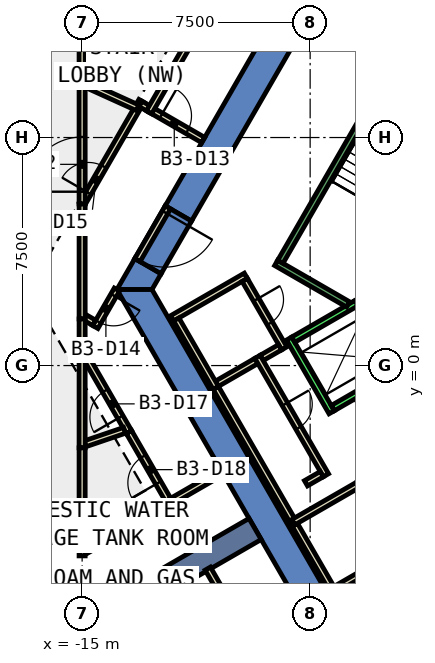
"""IFC4 building model, lengths in metres.
Left out: names, types, materials, properties, quantities, classifications, styles, units other than length and angle.
Written with IfcOpenShell. Run it as: python <this file> out.ifc"""

import sys

from ifc_helpers import new_model, si_unit, direction, frame, frame_2d, origin, place, context, subcontext, project, spatial, polyline, rectangle, outline, extrude, element, fill, save


model = new_model("IFC4")
c1 = context("Model", 3, precision=1e-05, world=origin(), true_north=direction((0.0, 1.0)))
c2 = subcontext(c1, "Body", "Model", "MODEL_VIEW")
j1 = project(units=[si_unit("LENGTHUNIT", "METRE"), si_unit("PLANEANGLEUNIT", "RADIAN")], contexts=[c1])
p1 = place(None, origin())
s1 = spatial("IfcSite", under=j1, at=p1, CompositionType="ELEMENT")
p2 = place(p1, origin())
s2 = spatial("IfcBuilding", under=s1, at=p2, CompositionType="ELEMENT")
p3 = place(p2, frame((0.0, 0.0, -16.5)))
s3 = spatial("IfcBuildingStorey", under=s2, at=p3, CompositionType="ELEMENT", Elevation=-16.5)
p4 = place(p3, origin())
e1 = element("IfcWall", 1, at=p4, inside=s3, PredefinedType="SHEAR", context=c2, shape_type="SweptSolid", body=[
    extrude(outline(polyline([(-12.267, 5.252), (-11.402, 4.752), (-6.351, 13.5), (-6.928, 14.5), (-12.267, 5.252)])), origin(), (0.0, 0.0, 1.0), 5.08),
])
p5 = place(p3, origin())
e2 = element("IfcWall", 2, at=p5, inside=s3, PredefinedType="SHEAR", context=c2, shape_type="SweptSolid", body=[
    extrude(outline(polyline([(-12.402, 3.02), (-13.267, 3.52), (-13.856, 2.5), (-12.702, 2.5), (-12.402, 3.02)])), origin(), (0.0, 0.0, 1.0), 5.08),
])
p6 = place(p3, frame((0.0, 0.0, 3.6)))
e3 = element("IfcWall", 3, at=p6, inside=s3, PredefinedType="SHEAR", context=c2, shape_type="SweptSolid", body=[
    extrude(outline(polyline([(-13.267, 3.52), (-12.402, 3.02), (-11.402, 4.752), (-12.267, 5.252), (-13.267, 3.52)])), origin(), (0.0, 0.0, 1.0), 1.48),
])
p7 = place(p3, origin())
e4 = element("IfcWall", 4, at=p7, inside=s3, PredefinedType="SHEAR", context=c2, shape_type="SweptSolid", body=[
    extrude(outline(polyline([(-13.856, 2.5), (-6.928, -9.5), (-6.351, -8.5), (-12.702, 2.5), (-13.856, 2.5)])), origin(), (0.0, 0.0, 1.0), 5.08),
])
p8 = place(p3, frame((-9.31, -5.375, 0.0), z_axis=(0.0, 0.0, 1.0), x_axis=(-0.866017533419, -0.500013631625, 0.0)))
e5 = element("IfcWall", 5, at=p8, inside=s3, PredefinedType="SHEAR", context=c2, shape_type="SweptSolid", body=[
    extrude(rectangle(XDim=9.0, YDim=0.8, at=frame_2d((4.5, 0.0))), origin(), (0.0, 0.0, 1.0), 5.08),
])
p9 = place(p3, frame((-8.033, -11.587, 0.0), z_axis=(0.0, 0.0, 1.0), x_axis=(-0.499974742752, 0.866039985572, 0.0)))
e6 = element("IfcWall", 6, at=p9, inside=s3, PredefinedType="PARTITIONING", context=c2, shape_type="SweptSolid", body=[
    extrude(rectangle(XDim=5.668, YDim=0.2, at=frame_2d((2.834, 0.0))), origin(), (0.0, 0.0, 1.0), 5.08),
])
p10 = place(p9, frame((1.788, 0.0, 0.0)))
e7 = element("IfcOpeningElement", 7, at=p10, cuts=e6, PredefinedType="OPENING", context=c2, shape_type="SweptSolid", body=[
    extrude(rectangle(XDim=1.0, YDim=2.1, at=frame_2d((0.5, 1.05))), frame((0.0, 0.11, 0.0), z_axis=(0.0, -1.0, 0.0), x_axis=(1.0, 0.0, 0.0)), (0.0, 0.0, 1.0), 0.22),
])
p11 = place(p3, frame((-12.749, 8.417, 0.0), z_axis=(0.0, 0.0, 1.0), x_axis=(0.866010750942, -0.50002537861, 0.0)))
e8 = element("IfcWall", 8, at=p11, inside=s3, PredefinedType="PARTITIONING", context=c2, shape_type="SweptSolid", body=[
    extrude(rectangle(XDim=2.0, YDim=0.2, at=frame_2d((1.0, 0.0))), origin(), (0.0, 0.0, 1.0), 5.08),
])
p12 = place(p11, frame((0.4, 0.0, 0.0)))
e9 = element("IfcOpeningElement", 9, at=p12, cuts=e8, PredefinedType="OPENING", context=c2, shape_type="SweptSolid", body=[
    extrude(rectangle(XDim=1.0, YDim=2.1, at=frame_2d((0.5, 1.05))), frame((0.0, 0.11, 0.0), z_axis=(0.0, -1.0, 0.0), x_axis=(1.0, 0.0, 0.0)), (0.0, 0.0, 1.0), 0.22),
])
p13 = place(p3, frame((-13.856, 2.5, 0.0), z_axis=(0.0, 0.0, 1.0), x_axis=(-0.499831418649, -0.866122712398, 0.0)))
e10 = element("IfcWall", 10, at=p13, inside=s3, PredefinedType="PARTITIONING", context=c2, shape_type="SweptSolid", body=[
    extrude(rectangle(XDim=1.422, YDim=0.2, at=frame_2d((0.711, 0.0))), origin(), (0.0, 0.0, 1.0), 5.08),
])
p14 = place(p13, frame((0.224, 0.0, 0.0)))
e11 = element("IfcOpeningElement", 11, at=p14, cuts=e10, PredefinedType="OPENING", context=c2, shape_type="SweptSolid", body=[
    extrude(rectangle(XDim=1.0, YDim=2.1, at=frame_2d((0.5, 1.05))), frame((0.0, 0.11, 0.0), z_axis=(0.0, -1.0, 0.0), x_axis=(1.0, 0.0, 0.0)), (0.0, 0.0, 1.0), 0.22),
])
p15 = place(p3, frame((-14.604, 1.405, 0.0), z_axis=(0.0, 0.0, 1.0), x_axis=(-0.865410684717, 0.501063216349, 0.0)))
e12 = element("IfcWall", 12, at=p15, inside=s3, PredefinedType="PARTITIONING", context=c2, shape_type="SweptSolid", body=[
    extrude(rectangle(XDim=0.357, YDim=0.2, at=frame_2d((0.179, 0.0))), origin(), (0.0, 0.0, 1.0), 5.08),
])
p16 = place(p3, frame((-15.0, 5.318, 0.0), z_axis=(0.0, 0.0, 1.0), x_axis=(0.500034145141, 0.866005689181, 0.0)))
e13 = element("IfcWall", 13, at=p16, inside=s3, PredefinedType="PARTITIONING", context=c2, shape_type="SweptSolid", body=[
    extrude(rectangle(XDim=3.91, YDim=0.2, at=frame_2d((1.955, 0.0))), origin(), (0.0, 0.0, 1.0), 5.08),
])
p17 = place(p16, frame((0.418, 0.0, 0.0)))
e14 = element("IfcOpeningElement", 14, at=p17, cuts=e13, PredefinedType="OPENING", context=c2, shape_type="SweptSolid", body=[
    extrude(rectangle(XDim=1.0, YDim=2.1, at=frame_2d((0.5, 1.05))), frame((0.0, 0.11, 0.0), z_axis=(0.0, -1.0, 0.0), x_axis=(1.0, 0.0, 0.0)), (0.0, 0.0, 1.0), 0.22),
])
p18 = place(p3, frame((-13.082, 8.609, 0.0), z_axis=(0.0, 0.0, 1.0), x_axis=(0.865998573537, -0.500046468473, 0.0)))
e15 = element("IfcWall", 15, at=p18, inside=s3, PredefinedType="PARTITIONING", context=c2, shape_type="SweptSolid", body=[
    extrude(rectangle(XDim=0.37, YDim=0.2, at=frame_2d((0.185, 0.0))), origin(), (0.0, 0.0, 1.0), 5.08),
])
p19 = place(p3, frame((-15.0, 1.534, 0.0), z_axis=(0.0, 0.0, 1.0), x_axis=(0.0, 1.0, 0.0)))
e16 = element("IfcWall", 16, at=p19, inside=s3, PredefinedType="PARTITIONING", context=c2, shape_type="SweptSolid", body=[
    extrude(rectangle(XDim=3.784, YDim=0.2, at=frame_2d((1.892, 0.0))), origin(), (0.0, 0.0, 1.0), 5.08),
])
p20 = place(p3, frame((-12.799, 8.33, 0.0), z_axis=(0.0, 0.0, 1.0), x_axis=(0.499923440311, 0.86606960103, 0.0)))
e17 = element("IfcWall", 17, at=p20, inside=s3, PredefinedType="PARTITIONING", context=c2, shape_type="SweptSolid", body=[
    extrude(rectangle(XDim=9.534, YDim=0.2, at=frame_2d((4.767, 0.0))), origin(), (0.0, 0.0, 1.0), 5.08),
])
p21 = place(p20, frame((5.766, 0.0, 0.0)))
e18 = element("IfcOpeningElement", 18, at=p21, cuts=e17, PredefinedType="OPENING", context=c2, shape_type="SweptSolid", body=[
    extrude(rectangle(XDim=1.0, YDim=2.1, at=frame_2d((0.5, 1.05))), frame((0.0, 0.11, 0.0), z_axis=(0.0, -1.0, 0.0), x_axis=(1.0, 0.0, 0.0)), (0.0, 0.0, 1.0), 0.22),
])
p22 = place(p3, frame((-13.46, -2.186, 0.0), z_axis=(0.0, 0.0, 1.0), x_axis=(-0.500060979923, 0.865990194147, 0.0)))
e19 = element("IfcWall", 19, at=p22, inside=s3, PredefinedType="PARTITIONING", context=c2, shape_type="SweptSolid", body=[
    extrude(rectangle(XDim=3.08, YDim=0.2, at=frame_2d((1.54, 0.0))), origin(), (0.0, 0.0, 1.0), 5.08),
])
p23 = place(p22, frame((0.569, 0.0, 0.0)))
e20 = element("IfcOpeningElement", 20, at=p23, cuts=e19, PredefinedType="OPENING", context=c2, shape_type="SweptSolid", body=[
    extrude(rectangle(XDim=1.0, YDim=2.1, at=frame_2d((0.5, 1.05))), frame((0.0, 0.11, 0.0), z_axis=(0.0, -1.0, 0.0), x_axis=(1.0, 0.0, 0.0)), (0.0, 0.0, 1.0), 0.22),
])
p24 = place(p3, frame((-12.124, -4.5, 0.0), z_axis=(0.0, 0.0, 1.0), x_axis=(-0.499991375441, 0.866030383119, 0.0)))
e21 = element("IfcWall", 21, at=p24, inside=s3, PredefinedType="PARTITIONING", context=c2, shape_type="SweptSolid", body=[
    extrude(rectangle(XDim=2.672, YDim=0.2, at=frame_2d((1.336, 0.0))), origin(), (0.0, 0.0, 1.0), 5.08),
])
p25 = place(p24, frame((0.743, 0.0, 0.0)))
e22 = element("IfcOpeningElement", 22, at=p25, cuts=e21, PredefinedType="OPENING", context=c2, shape_type="SweptSolid", body=[
    extrude(rectangle(XDim=1.0, YDim=2.1, at=frame_2d((0.5, 1.05))), frame((0.0, 0.11, 0.0), z_axis=(0.0, -1.0, 0.0), x_axis=(1.0, 0.0, 0.0)), (0.0, 0.0, 1.0), 0.22),
])
p26 = place(p3, frame((-10.392, -3.5, 0.0), z_axis=(0.0, 0.0, 1.0), x_axis=(-0.865980106173, -0.500078449558, 0.0)))
e23 = element("IfcWall", 23, at=p26, inside=s3, PredefinedType="PARTITIONING", context=c2, shape_type="SweptSolid", body=[
    extrude(rectangle(XDim=1.9, YDim=0.2, at=frame_2d((0.95, 0.0))), origin(), (0.0, 0.0, 1.0), 5.08),
])
p27 = place(p3, frame((-15.0, 0.581, 0.0), z_axis=(0.0, 0.0, 1.0), x_axis=(0.0, 1.0, 0.0)))
e24 = element("IfcWall", 24, at=p27, inside=s3, PredefinedType="PARTITIONING", context=c2, shape_type="SweptSolid", body=[
    extrude(rectangle(XDim=0.953, YDim=0.2, at=frame_2d((0.477, 0.0))), origin(), (0.0, 0.0, 1.0), 5.08),
])
p28 = place(p3, frame((-14.909, 9.264, 0.0), z_axis=(0.0, 0.0, 1.0), x_axis=(0.910722060418, -0.41301976789, 0.0)))
e25 = element("IfcWall", 25, at=p28, inside=s3, PredefinedType="PARTITIONING", context=c2, shape_type="SweptSolid", body=[
    extrude(rectangle(XDim=1.903, YDim=0.2, at=frame_2d((0.951, 0.0))), origin(), (0.0, 0.0, 1.0), 5.08),
])
p29 = place(p3, frame((-15.0, 5.318, 0.0), z_axis=(0.0, 0.0, 1.0), x_axis=(0.0, 1.0, 0.0)))
e26 = element("IfcWall", 26, at=p29, inside=s3, PredefinedType="PARTITIONING", context=c2, shape_type="SweptSolid", body=[
    extrude(rectangle(XDim=4.087, YDim=0.2, at=frame_2d((2.043, 0.0))), origin(), (0.0, 0.0, 1.0), 5.08),
])
p30 = place(p29, frame((0.4, 0.0, 0.0)))
e27 = element("IfcOpeningElement", 27, at=p30, cuts=e26, PredefinedType="OPENING", context=c2, shape_type="SweptSolid", body=[
    extrude(rectangle(XDim=1.8, YDim=2.1, at=frame_2d((0.9, 1.05))), frame((0.0, 0.11, 0.0), z_axis=(0.0, -1.0, 0.0), x_axis=(1.0, 0.0, 0.0)), (0.0, 0.0, 1.0), 0.22),
])
p31 = place(p3, frame((-15.0, 9.405, 0.0), z_axis=(0.0, 0.0, 1.0), x_axis=(0.0, 1.0, 0.0)))
e28 = element("IfcWall", 28, at=p31, inside=s3, PredefinedType="PARTITIONING", context=c2, shape_type="SweptSolid", body=[
    extrude(rectangle(XDim=23.495, YDim=0.2, at=frame_2d((11.748, 0.0))), origin(), (0.0, 0.0, 1.0), 5.08),
])
p32 = place(p3, frame((-13.605, -2.131, 0.0), z_axis=(0.0, 0.0, 1.0), x_axis=(-0.946582963452, -0.32246037478, 0.0)))
e29 = element("IfcWall", 29, at=p32, inside=s3, PredefinedType="PARTITIONING", context=c2, shape_type="SweptSolid", body=[
    extrude(rectangle(XDim=1.373, YDim=0.2, at=frame_2d((0.687, 0.0))), origin(), (0.0, 0.0, 1.0), 5.08),
])
p33 = place(p3, frame((-15.0, -2.706, 0.0), z_axis=(0.0, 0.0, 1.0), x_axis=(0.0, 1.0, 0.0)))
e30 = element("IfcWall", 30, at=p33, inside=s3, PredefinedType="PARTITIONING", context=c2, shape_type="SweptSolid", body=[
    extrude(rectangle(XDim=3.287, YDim=0.2, at=frame_2d((1.644, 0.0))), origin(), (0.0, 0.0, 1.0), 5.08),
])
p34 = place(p3, frame((-12.037, -4.45, 0.0), z_axis=(0.0, 0.0, 1.0), x_axis=(-0.866063163075, -0.499934593286, 0.0)))
e31 = element("IfcWall", 31, at=p34, inside=s3, PredefinedType="PARTITIONING", context=c2, shape_type="SweptSolid", body=[
    extrude(rectangle(XDim=3.321, YDim=0.2, at=frame_2d((1.66, 0.0))), origin(), (0.0, 0.0, 1.0), 5.08),
])
p35 = place(p3, frame((-15.0, -6.26, 0.0), z_axis=(0.0, 0.0, 1.0), x_axis=(0.0, 1.0, 0.0)))
e32 = element("IfcWall", 32, at=p35, inside=s3, PredefinedType="PARTITIONING", context=c2, shape_type="SweptSolid", body=[
    extrude(rectangle(XDim=3.554, YDim=0.2, at=frame_2d((1.777, 0.0))), origin(), (0.0, 0.0, 1.0), 5.08),
])
p36 = place(p3, frame((-9.267, 0.152, 0.0), z_axis=(0.0, 0.0, 1.0), x_axis=(-0.86599040064, -0.500060622324, 0.0)))
e33 = element("IfcWall", 33, at=p36, inside=s3, PredefinedType="PARTITIONING", context=c2, shape_type="SweptSolid", body=[
    extrude(rectangle(XDim=1.5, YDim=0.2, at=frame_2d((0.75, 0.0))), origin(), (0.0, 0.0, 1.0), 5.08),
])
p37 = place(p3, frame((-12.04, 1.553, 0.0), z_axis=(0.0, 0.0, 1.0), x_axis=(0.866056369097, 0.49994636267, 0.0)))
e34 = element("IfcWall", 34, at=p37, inside=s3, PredefinedType="PARTITIONING", context=c2, shape_type="SweptSolid", body=[
    extrude(rectangle(XDim=2.8, YDim=0.2, at=frame_2d((1.4, 0.0))), origin(), (0.0, 0.0, 1.0), 5.08),
])
p38 = place(p3, frame((-9.651, 2.817, 0.0), z_axis=(0.0, 0.0, 1.0), x_axis=(0.49989585183, -0.866085525409, 0.0)))
e35 = element("IfcWall", 35, at=p38, inside=s3, PredefinedType="PARTITIONING", context=c2, shape_type="SweptSolid", body=[
    extrude(rectangle(XDim=2.6, YDim=0.2, at=frame_2d((1.3, 0.0))), origin(), (0.0, 0.0, 1.0), 5.08),
])
p39 = place(p38, frame((0.75, 0.0, 0.0)))
e36 = element("IfcOpeningElement", 36, at=p39, cuts=e35, PredefinedType="OPENING", context=c2, shape_type="SweptSolid", body=[
    extrude(rectangle(XDim=0.9, YDim=2.1, at=frame_2d((0.45, 1.05))), frame((0.0, 0.11, 0.0), z_axis=(0.0, -1.0, 0.0), x_axis=(1.0, 0.0, 0.0)), (0.0, 0.0, 1.0), 0.22),
])
p40 = place(p3, frame((-8.488, 0.602, 0.0), z_axis=(0.0, 0.0, 1.0), x_axis=(-0.865871789474, -0.500265973451, 0.0)))
e37 = element("IfcWall", 37, at=p40, inside=s3, PredefinedType="PARTITIONING", context=c2, shape_type="SweptSolid", body=[
    extrude(rectangle(XDim=0.7, YDim=0.2, at=frame_2d((0.35, 0.0))), origin(), (0.0, 0.0, 1.0), 5.08),
])
p41 = place(p3, frame((-10.603, -0.735, 0.0), z_axis=(0.0, 0.0, 1.0), x_axis=(-0.499925626596, 0.866068339032, 0.0)))
e38 = element("IfcWall", 38, at=p41, inside=s3, PredefinedType="PARTITIONING", context=c2, shape_type="SweptSolid", body=[
    extrude(rectangle(XDim=2.601, YDim=0.2, at=frame_2d((1.3, 0.0))), origin(), (0.0, 0.0, 1.0), 5.08),
])
p42 = place(p3, frame((-9.231, 0.288, 0.0), z_axis=(0.0, 0.0, 1.0), x_axis=(0.500013631625, -0.866017533419, 0.0)))
e39 = element("IfcWall", 39, at=p42, inside=s3, PredefinedType="PARTITIONING", context=c2, shape_type="SweptSolid", body=[
    extrude(rectangle(XDim=4.5, YDim=0.2, at=frame_2d((2.25, 0.0))), origin(), (0.0, 0.0, 1.0), 5.08),
])
p43 = place(p42, frame((1.8, 0.0, 0.0)))
e40 = element("IfcOpeningElement", 40, at=p43, cuts=e39, PredefinedType="OPENING", context=c2, shape_type="SweptSolid", body=[
    extrude(rectangle(XDim=0.9, YDim=2.1, at=frame_2d((0.45, 1.05))), frame((0.0, 0.11, 0.0), z_axis=(0.0, -1.0, 0.0), x_axis=(1.0, 0.0, 0.0)), (0.0, 0.0, 1.0), 0.22),
])
p44 = place(p3, frame((-7.117, -3.572, 0.0), z_axis=(0.0, 0.0, 1.0), x_axis=(-0.866158505053, -0.499769390944, 0.0)))
e41 = element("IfcWall", 41, at=p44, inside=s3, PredefinedType="PARTITIONING", context=c2, shape_type="SweptSolid", body=[
    extrude(rectangle(XDim=0.6, YDim=0.2, at=frame_2d((0.3, 0.0))), origin(), (0.0, 0.0, 1.0), 5.08),
])
p45 = place(p3, frame((-8.003, -5.238, 0.0), z_axis=(0.0, 0.0, 1.0), x_axis=(-0.500047596559, 0.865997922154, 0.0)))
e42 = element("IfcWall", 42, at=p45, inside=s3, PredefinedType="PARTITIONING", context=c2, shape_type="SweptSolid", body=[
    extrude(rectangle(XDim=5.2, YDim=0.2, at=frame_2d((2.6, 0.0))), origin(), (0.0, 0.0, 1.0), 5.08),
])
p46 = place(p3, frame((-6.803, -7.317, 0.0), z_axis=(0.0, 0.0, 1.0), x_axis=(-0.499913221443, 0.866075499611, 0.0)))
e43 = element("IfcWall", 43, at=p46, inside=s3, PredefinedType="PARTITIONING", context=c2, shape_type="SweptSolid", body=[
    extrude(rectangle(XDim=2.4, YDim=0.2, at=frame_2d((1.2, 0.0))), origin(), (0.0, 0.0, 1.0), 5.08),
])
p47 = place(p3, frame((-8.053, -5.151, 0.0), z_axis=(0.0, 0.0, 1.0), x_axis=(0.866234368172, 0.499637888272, 0.0)))
e44 = element("IfcWall", 44, at=p47, inside=s3, PredefinedType="PARTITIONING", context=c2, shape_type="SweptSolid", body=[
    extrude(rectangle(XDim=2.499, YDim=0.2, at=frame_2d((1.25, 0.0))), origin(), (0.0, 0.0, 1.0), 5.08),
])
p48 = place(p3, frame((-4.415, -6.053, 0.0), z_axis=(0.0, 0.0, 1.0), x_axis=(-0.866056369097, -0.49994636267, 0.0)))
e45 = element("IfcWall", 45, at=p48, inside=s3, PredefinedType="PARTITIONING", context=c2, shape_type="SweptSolid", body=[
    extrude(rectangle(XDim=2.8, YDim=0.2, at=frame_2d((1.4, 0.0))), origin(), (0.0, 0.0, 1.0), 5.08),
])
p49 = place(p3, frame((-5.126, -2.422, 0.0), z_axis=(0.0, 0.0, 1.0), x_axis=(-0.500062241894, 0.865989465428, 0.0)))
e46 = element("IfcWall", 46, at=p49, inside=s3, PredefinedType="PARTITIONING", context=c2, shape_type="SweptSolid", body=[
    extrude(rectangle(XDim=1.7, YDim=0.2, at=frame_2d((0.85, 0.0))), origin(), (0.0, 0.0, 1.0), 5.08),
])
p50 = place(p3, frame((-12.18, 5.202, 0.0), z_axis=(0.0, 0.0, 1.0), x_axis=(-0.50002537861, -0.866010750942, 0.0)))
e47 = element("IfcWall", 47, at=p50, inside=s3, PredefinedType="PARTITIONING", context=c2, shape_type="SweptSolid", body=[
    extrude(rectangle(XDim=2.0, YDim=0.2, at=frame_2d((1.0, 0.0))), origin(), (0.0, 0.0, 1.0), 2.4),
])
p51 = place(p50, frame((0.19, 0.0, 0.0)))
e48 = element("IfcOpeningElement", 48, at=p51, cuts=e47, PredefinedType="OPENING", context=c2, shape_type="SweptSolid", body=[
    extrude(rectangle(XDim=1.8, YDim=2.1, at=frame_2d((0.9, 1.05))), frame((0.0, 0.11, 0.0), z_axis=(0.0, -1.0, 0.0), x_axis=(1.0, 0.0, 0.0)), (0.0, 0.0, 1.0), 0.22),
])
p52 = place(p3, frame((-8.192, 0.888, 0.0), z_axis=(0.0, 0.0, 1.0), x_axis=(0.49994636267, -0.866056369097, 0.0)))
e49 = element("IfcWall", 49, at=p52, inside=s3, PredefinedType="STANDARD", context=c2, shape_type="SweptSolid", body=[
    extrude(rectangle(XDim=2.8, YDim=0.2, at=frame_2d((1.4, 0.0))), origin(), (0.0, 0.0, 1.0), 5.08),
])
for number, where, z_axis, x_axis in (
    (50, (-5.977, 2.052, 0.0), (0.0, 0.0, 1.0), (-0.866, -0.5, 0.0)),
    (51, (-4.677, -0.2, 0.0), (0.0, 0.0, 1.0), (-0.866, -0.5, 0.0)),
):
    element("IfcWall", number, at=place(p3, frame(where, z_axis=z_axis, x_axis=x_axis)), inside=s3, PredefinedType="STANDARD", context=c2, shape_type="SweptSolid", body=[
        extrude(rectangle(XDim=2.399, YDim=0.2, at=frame_2d((1.2, 0.0))), origin(), (0.0, 0.0, 1.0), 5.08),
    ])
p53 = place(p3, frame((-6.25, 2.01, 0.0), z_axis=(0.0, 0.0, 1.0), x_axis=(-0.86611865017, 0.499838457731, 0.0)))
e52 = element("IfcWall", 52, at=p53, inside=s3, PredefinedType="STANDARD", context=c2, shape_type="SweptSolid", body=[
    extrude(rectangle(XDim=2.733, YDim=0.2, at=frame_2d((1.366, 0.0))), origin(), (0.0, 0.0, 1.0), 5.08),
])
p54 = place(p3, frame((-5.03, 9.388, 0.0), z_axis=(0.0, 0.0, 1.0), x_axis=(-0.499978703459, -0.866037698999, 0.0)))
e53 = element("IfcWall", 53, at=p54, inside=s3, PredefinedType="STANDARD", context=c2, shape_type="SweptSolid", body=[
    extrude(rectangle(XDim=6.9, YDim=0.2, at=frame_2d((3.45, 0.0))), origin(), (0.0, 0.0, 1.0), 5.08),
])
p55 = place(p12, origin())
e54 = element("IfcDoor", 54, at=p55, inside=s3, OperationType="SINGLE_SWING_LEFT", PredefinedType="DOOR", context=c2, shape_type="SweptSolid", body=[
    extrude(rectangle(XDim=1.0, YDim=2.1, at=frame_2d((0.5, 1.05))), frame((0.0, 0.025, 0.0), z_axis=(0.0, -1.0, 0.0), x_axis=(1.0, 0.0, 0.0)), (0.0, 0.0, 1.0), 0.05),
])
fill(e9, e54)
p56 = place(p14, origin())
e55 = element("IfcDoor", 55, at=p56, inside=s3, OperationType="SINGLE_SWING_RIGHT", PredefinedType="DOOR", context=c2, shape_type="SweptSolid", body=[
    extrude(rectangle(XDim=1.0, YDim=2.1, at=frame_2d((0.5, 1.05))), frame((0.0, 0.025, 0.0), z_axis=(0.0, -1.0, 0.0), x_axis=(1.0, 0.0, 0.0)), (0.0, 0.0, 1.0), 0.05),
])
fill(e11, e55)
p57 = place(p17, origin())
e56 = element("IfcDoor", 56, at=p57, inside=s3, OperationType="SINGLE_SWING_LEFT", PredefinedType="DOOR", context=c2, shape_type="SweptSolid", body=[
    extrude(rectangle(XDim=1.0, YDim=2.1, at=frame_2d((0.5, 1.05))), frame((0.0, 0.025, 0.0), z_axis=(0.0, -1.0, 0.0), x_axis=(1.0, 0.0, 0.0)), (0.0, 0.0, 1.0), 0.05),
])
fill(e14, e56)
p58 = place(p23, origin())
e57 = element("IfcDoor", 57, at=p58, inside=s3, OperationType="SINGLE_SWING_LEFT", PredefinedType="DOOR", context=c2, shape_type="SweptSolid", body=[
    extrude(rectangle(XDim=1.0, YDim=2.1, at=frame_2d((0.5, 1.05))), frame((0.0, 0.025, 0.0), z_axis=(0.0, -1.0, 0.0), x_axis=(1.0, 0.0, 0.0)), (0.0, 0.0, 1.0), 0.05),
])
fill(e20, e57)
p59 = place(p25, origin())
e58 = element("IfcDoor", 58, at=p59, inside=s3, OperationType="SINGLE_SWING_RIGHT", PredefinedType="DOOR", context=c2, shape_type="SweptSolid", body=[
    extrude(rectangle(XDim=1.0, YDim=2.1, at=frame_2d((0.5, 1.05))), frame((0.0, 0.025, 0.0), z_axis=(0.0, -1.0, 0.0), x_axis=(1.0, 0.0, 0.0)), (0.0, 0.0, 1.0), 0.05),
])
fill(e22, e58)
p60 = place(p30, origin())
e59 = element("IfcDoor", 59, at=p60, inside=s3, OperationType="DOUBLE_DOOR_SINGLE_SWING", PredefinedType="DOOR", context=c2, shape_type="SweptSolid", body=[
    extrude(rectangle(XDim=1.8, YDim=2.1, at=frame_2d((0.9, 1.05))), frame((0.0, 0.025, 0.0), z_axis=(0.0, -1.0, 0.0), x_axis=(1.0, 0.0, 0.0)), (0.0, 0.0, 1.0), 0.05),
])
fill(e27, e59)
p61 = place(p39, origin())
e60 = element("IfcDoor", 60, at=p61, inside=s3, OperationType="SINGLE_SWING_RIGHT", PredefinedType="DOOR", context=c2, shape_type="SweptSolid", body=[
    extrude(rectangle(XDim=0.9, YDim=2.1, at=frame_2d((0.45, 1.05))), frame((0.0, 0.025, 0.0), z_axis=(0.0, -1.0, 0.0), x_axis=(1.0, 0.0, 0.0)), (0.0, 0.0, 1.0), 0.05),
])
fill(e36, e60)
p62 = place(p43, origin())
e61 = element("IfcDoor", 61, at=p62, inside=s3, OperationType="SINGLE_SWING_LEFT", PredefinedType="DOOR", context=c2, shape_type="SweptSolid", body=[
    extrude(rectangle(XDim=0.9, YDim=2.1, at=frame_2d((0.45, 1.05))), frame((0.0, 0.025, 0.0), z_axis=(0.0, -1.0, 0.0), x_axis=(1.0, 0.0, 0.0)), (0.0, 0.0, 1.0), 0.05),
])
fill(e40, e61)
p63 = place(p51, origin())
e62 = element("IfcDoor", 62, at=p63, inside=s3, OperationType="DOUBLE_DOOR_SINGLE_SWING", PredefinedType="DOOR", context=c2, shape_type="SweptSolid", body=[
    extrude(rectangle(XDim=1.8, YDim=2.1, at=frame_2d((0.9, 1.05))), frame((0.0, 0.025, 0.0), z_axis=(0.0, -1.0, 0.0), x_axis=(1.0, 0.0, 0.0)), (0.0, 0.0, 1.0), 0.05),
])
fill(e48, e62)
save(model, sys.argv[1])
